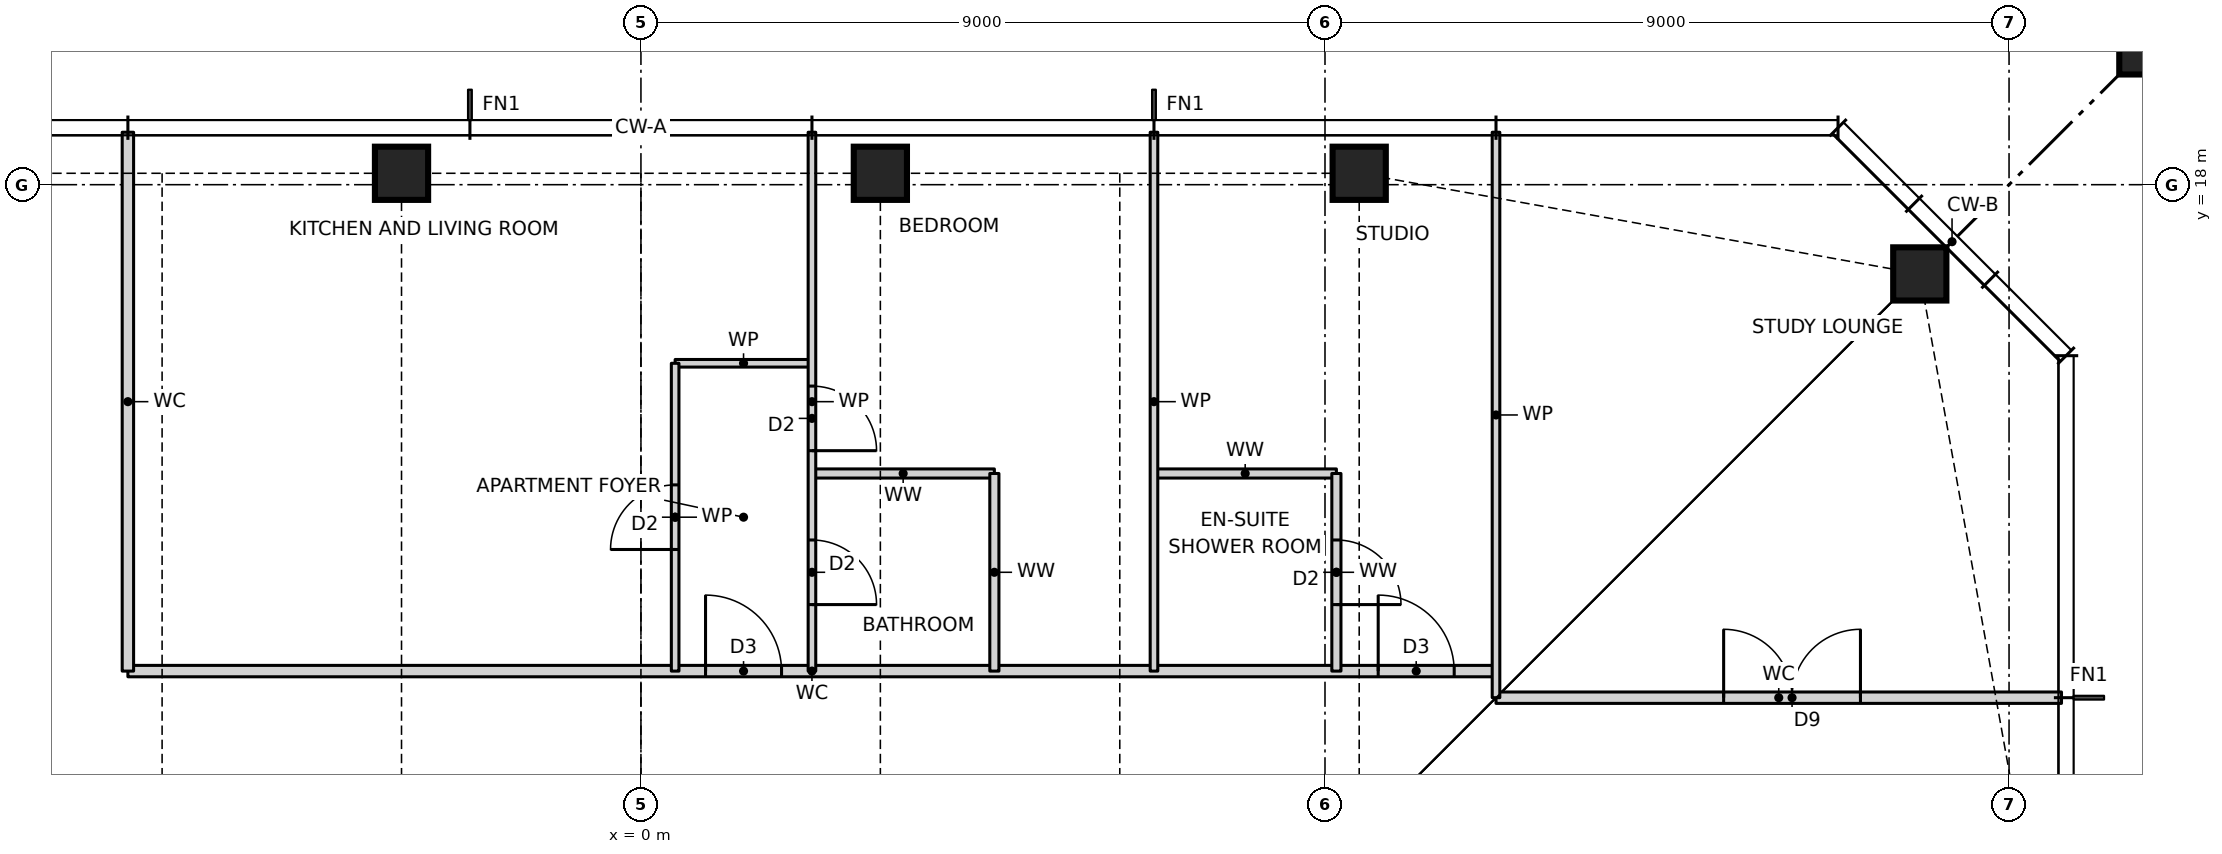
"""IFC4 building model, lengths in metres.
Left out: names, types, materials, properties, quantities, classifications, styles, units other than length and angle.
Written with IfcOpenShell. Run it as: python <this file> out.ifc"""

import sys

from ifc_helpers import new_model, si_unit, direction, frame, frame_2d, origin, origin_2d, place, context, subcontext, project, spatial, rectangle, hollow_rectangle, i_section, extrude, element, fill, save


model = new_model("IFC4")
c1 = context("Model", 3, precision=1e-05, world=origin(), true_north=direction((0.0, 1.0)))
c2 = subcontext(c1, "Body", "Model", "MODEL_VIEW")
j1 = project(units=[si_unit("LENGTHUNIT", "METRE"), si_unit("PLANEANGLEUNIT", "RADIAN")], contexts=[c1])
p1 = place(None, origin())
s1 = spatial("IfcSite", under=j1, at=p1, CompositionType="ELEMENT")
p2 = place(p1, origin())
s2 = spatial("IfcBuilding", under=s1, at=p2, CompositionType="ELEMENT")
p3 = place(p2, frame((0.0, 0.0, 191.5)))
s3 = spatial("IfcBuildingStorey", under=s2, at=p3, CompositionType="ELEMENT", Elevation=191.5)
for number, where, z_axis, x_axis in (
    (1, (16.826, 16.826, 0.0), (0.0, 0.0, 1.0), (1.0, 0.0, 0.0)),
    (2, (9.45, 18.15, 0.0), (0.0, 0.0, 1.0), (1.0, 0.0, 0.0)),
    (3, (3.15, 18.15, 0.0), (0.0, 0.0, 1.0), (1.0, 0.0, 0.0)),
    (4, (-3.15, 18.15, 0.0), (0.0, 0.0, 1.0), (1.0, 0.0, 0.0)),
):
    element("IfcColumn", number, at=place(p3, frame(where, z_axis=z_axis, x_axis=x_axis)), inside=s3, PredefinedType="COLUMN", context=c2, shape_type="SweptSolid", body=[
        extrude(hollow_rectangle(XDim=0.7, YDim=0.7, WallThickness=0.06, at=origin_2d()), origin(), (0.0, 0.0, 1.0), 3.5),
    ])
p4 = place(p3, frame((21.65, 21.65, 0.0), z_axis=(0.0, 0.0, 1.0), x_axis=(1.0, 0.0, 0.0)))
e5 = element("IfcColumn", 5, at=p4, inside=s3, PredefinedType="COLUMN", context=c2, shape_type="SweptSolid", body=[
    extrude(rectangle(XDim=4.4, YDim=4.4, at=origin_2d()), origin(), (0.0, 0.0, 1.0), 3.5),
    extrude(i_section(OverallWidth=0.478, OverallDepth=0.599, WebThickness=0.1, FlangeThickness=0.14, at=origin_2d()), origin(), (0.0, 0.0, 1.0), 3.5),
])
p5 = place(p3, frame((11.25, 11.25, 0.0), z_axis=(0.0, 0.0, 1.0), x_axis=(1.0, 0.0, 0.0)))
e6 = element("IfcWall", 6, at=p5, inside=s3, PredefinedType="PARTITIONING", context=c2, shape_type="SweptSolid", body=[
    extrude(rectangle(XDim=7.44, YDim=0.15, at=frame_2d((3.72, 0.0))), origin(), (0.0, 0.0, 1.0), 3.27),
])
p6 = place(p5, frame((2.995, 0.0, 0.0)))
e7 = element("IfcOpeningElement", 7, at=p6, cuts=e6, PredefinedType="OPENING", context=c2, shape_type="SweptSolid", body=[
    extrude(rectangle(XDim=1.8, YDim=2.1, at=frame_2d((0.9, 1.05))), frame((0.0, 0.085, 0.0), z_axis=(0.0, -1.0, 0.0), x_axis=(1.0, 0.0, 0.0)), (0.0, 0.0, 1.0), 0.17),
])
p7 = place(p3, frame((-6.75, 11.6, 0.0), z_axis=(0.0, 0.0, 1.0), x_axis=(1.0, 0.0, 0.0)))
e8 = element("IfcWall", 8, at=p7, inside=s3, PredefinedType="PARTITIONING", context=c2, shape_type="SweptSolid", body=[
    extrude(rectangle(XDim=18.0, YDim=0.15, at=frame_2d((9.0, 0.0))), origin(), (0.0, 0.0, 1.0), 3.27),
])
p8 = place(p7, frame((16.45, 0.0, 0.0)))
e9 = element("IfcOpeningElement", 9, at=p8, cuts=e8, PredefinedType="OPENING", context=c2, shape_type="SweptSolid", body=[
    extrude(rectangle(XDim=1.0, YDim=2.1, at=frame_2d((0.5, 1.05))), frame((0.0, 0.085, 0.0), z_axis=(0.0, -1.0, 0.0), x_axis=(1.0, 0.0, 0.0)), (0.0, 0.0, 1.0), 0.17),
])
p9 = place(p7, frame((7.6, 0.0, 0.0)))
e10 = element("IfcOpeningElement", 10, at=p9, cuts=e8, PredefinedType="OPENING", context=c2, shape_type="SweptSolid", body=[
    extrude(rectangle(XDim=1.0, YDim=2.1, at=frame_2d((0.5, 1.05))), frame((0.0, 0.085, 0.0), z_axis=(0.0, -1.0, 0.0), x_axis=(1.0, 0.0, 0.0)), (0.0, 0.0, 1.0), 0.17),
])
for number, where, z_axis, x_axis in (
    (11, (2.25, 14.2, 0.0), (0.0, 0.0, 1.0), (1.0, 0.0, 0.0)),
    (12, (6.75, 14.2, 0.0), (0.0, 0.0, 1.0), (1.0, 0.0, 0.0)),
):
    element("IfcWall", number, at=place(p3, frame(where, z_axis=z_axis, x_axis=x_axis)), inside=s3, PredefinedType="PARTITIONING", context=c2, shape_type="SweptSolid", body=[
        extrude(rectangle(XDim=2.4, YDim=0.12, at=frame_2d((1.2, 0.0))), origin(), (0.0, 0.0, 1.0), 3.27),
    ])
p10 = place(p3, frame((0.45, 15.65, 0.0), z_axis=(0.0, 0.0, 1.0), x_axis=(1.0, 0.0, 0.0)))
e13 = element("IfcWall", 13, at=p10, inside=s3, PredefinedType="PARTITIONING", context=c2, shape_type="SweptSolid", body=[
    extrude(rectangle(XDim=1.8, YDim=0.1, at=frame_2d((0.9, 0.0))), origin(), (0.0, 0.0, 1.0), 3.27),
])
p11 = place(p3, frame((11.25, 11.25, 0.0), z_axis=(0.0, 0.0, 1.0), x_axis=(0.0, 1.0, 0.0)))
e14 = element("IfcWall", 14, at=p11, inside=s3, PredefinedType="PARTITIONING", context=c2, shape_type="SweptSolid", body=[
    extrude(rectangle(XDim=7.44, YDim=0.1, at=frame_2d((3.72, 0.0))), origin(), (0.0, 0.0, 1.0), 3.27),
])
p12 = place(p3, frame((9.15, 11.6, 0.0), z_axis=(0.0, 0.0, 1.0), x_axis=(0.0, 1.0, 0.0)))
e15 = element("IfcWall", 15, at=p12, inside=s3, PredefinedType="PARTITIONING", context=c2, shape_type="SweptSolid", body=[
    extrude(rectangle(XDim=2.6, YDim=0.12, at=frame_2d((1.3, 0.0))), origin(), (0.0, 0.0, 1.0), 3.27),
])
p13 = place(p12, frame((0.875, 0.0, 0.0)))
e16 = element("IfcOpeningElement", 16, at=p13, cuts=e15, PredefinedType="OPENING", context=c2, shape_type="SweptSolid", body=[
    extrude(rectangle(XDim=0.85, YDim=2.1, at=frame_2d((0.425, 1.05))), frame((0.0, 0.07, 0.0), z_axis=(0.0, -1.0, 0.0), x_axis=(1.0, 0.0, 0.0)), (0.0, 0.0, 1.0), 0.14),
])
p14 = place(p3, frame((6.75, 11.6, 0.0), z_axis=(0.0, 0.0, 1.0), x_axis=(0.0, 1.0, 0.0)))
e17 = element("IfcWall", 17, at=p14, inside=s3, PredefinedType="PARTITIONING", context=c2, shape_type="SweptSolid", body=[
    extrude(rectangle(XDim=7.09, YDim=0.1, at=frame_2d((3.545, 0.0))), origin(), (0.0, 0.0, 1.0), 3.27),
])
p15 = place(p3, frame((4.65, 11.6, 0.0), z_axis=(0.0, 0.0, 1.0), x_axis=(0.0, 1.0, 0.0)))
e18 = element("IfcWall", 18, at=p15, inside=s3, PredefinedType="PARTITIONING", context=c2, shape_type="SweptSolid", body=[
    extrude(rectangle(XDim=2.6, YDim=0.12, at=frame_2d((1.3, 0.0))), origin(), (0.0, 0.0, 1.0), 3.27),
])
p16 = place(p3, frame((2.25, 11.6, 0.0), z_axis=(0.0, 0.0, 1.0), x_axis=(0.0, 1.0, 0.0)))
e19 = element("IfcWall", 19, at=p16, inside=s3, PredefinedType="PARTITIONING", context=c2, shape_type="SweptSolid", body=[
    extrude(rectangle(XDim=7.09, YDim=0.1, at=frame_2d((3.545, 0.0))), origin(), (0.0, 0.0, 1.0), 3.27),
])
p17 = place(p16, frame((2.9, 0.0, 0.0)))
e20 = element("IfcOpeningElement", 20, at=p17, cuts=e19, PredefinedType="OPENING", context=c2, shape_type="SweptSolid", body=[
    extrude(rectangle(XDim=0.85, YDim=2.1, at=frame_2d((0.425, 1.05))), frame((0.0, 0.06, 0.0), z_axis=(0.0, -1.0, 0.0), x_axis=(1.0, 0.0, 0.0)), (0.0, 0.0, 1.0), 0.12),
])
p18 = place(p16, frame((0.875, 0.0, 0.0)))
e21 = element("IfcOpeningElement", 21, at=p18, cuts=e19, PredefinedType="OPENING", context=c2, shape_type="SweptSolid", body=[
    extrude(rectangle(XDim=0.85, YDim=2.1, at=frame_2d((0.425, 1.05))), frame((0.0, 0.06, 0.0), z_axis=(0.0, -1.0, 0.0), x_axis=(1.0, 0.0, 0.0)), (0.0, 0.0, 1.0), 0.12),
])
p19 = place(p3, frame((0.45, 11.6, 0.0), z_axis=(0.0, 0.0, 1.0), x_axis=(0.0, 1.0, 0.0)))
e22 = element("IfcWall", 22, at=p19, inside=s3, PredefinedType="PARTITIONING", context=c2, shape_type="SweptSolid", body=[
    extrude(rectangle(XDim=4.05, YDim=0.1, at=frame_2d((2.025, 0.0))), origin(), (0.0, 0.0, 1.0), 3.27),
])
p20 = place(p19, frame((1.6, 0.0, 0.0)))
e23 = element("IfcOpeningElement", 23, at=p20, cuts=e22, PredefinedType="OPENING", context=c2, shape_type="SweptSolid", body=[
    extrude(rectangle(XDim=0.85, YDim=2.1, at=frame_2d((0.425, 1.05))), frame((0.0, 0.06, 0.0), z_axis=(0.0, -1.0, 0.0), x_axis=(1.0, 0.0, 0.0)), (0.0, 0.0, 1.0), 0.12),
])
p21 = place(p3, frame((-6.75, 11.6, 0.0), z_axis=(0.0, 0.0, 1.0), x_axis=(0.0, 1.0, 0.0)))
e24 = element("IfcWall", 24, at=p21, inside=s3, PredefinedType="PARTITIONING", context=c2, shape_type="SweptSolid", body=[
    extrude(rectangle(XDim=7.09, YDim=0.15, at=frame_2d((3.545, 0.0))), origin(), (0.0, 0.0, 1.0), 3.27),
])
p22 = place(p8, origin())
e25 = element("IfcDoor", 25, at=p22, inside=s3, OperationType="SINGLE_SWING_LEFT", PredefinedType="DOOR", context=c2, shape_type="SweptSolid", body=[
    extrude(rectangle(XDim=1.0, YDim=2.1, at=frame_2d((0.5, 1.05))), frame((0.0, 0.025, 0.0), z_axis=(0.0, -1.0, 0.0), x_axis=(1.0, 0.0, 0.0)), (0.0, 0.0, 1.0), 0.05),
])
fill(e9, e25)
p23 = place(p13, frame((0.85, 0.0, 0.0), z_axis=(0.0, 0.0, 1.0), x_axis=(-1.0, 0.0, 0.0)))
e26 = element("IfcDoor", 26, at=p23, inside=s3, OperationType="SINGLE_SWING_RIGHT", PredefinedType="DOOR", context=c2, shape_type="SweptSolid", body=[
    extrude(rectangle(XDim=0.85, YDim=2.1, at=frame_2d((0.425, 1.05))), frame((0.0, 0.025, 0.0), z_axis=(0.0, -1.0, 0.0), x_axis=(1.0, 0.0, 0.0)), (0.0, 0.0, 1.0), 0.05),
])
fill(e16, e26)
p24 = place(p9, origin())
e27 = element("IfcDoor", 27, at=p24, inside=s3, OperationType="SINGLE_SWING_LEFT", PredefinedType="DOOR", context=c2, shape_type="SweptSolid", body=[
    extrude(rectangle(XDim=1.0, YDim=2.1, at=frame_2d((0.5, 1.05))), frame((0.0, 0.025, 0.0), z_axis=(0.0, -1.0, 0.0), x_axis=(1.0, 0.0, 0.0)), (0.0, 0.0, 1.0), 0.05),
])
fill(e10, e27)
p25 = place(p20, origin())
e28 = element("IfcDoor", 28, at=p25, inside=s3, OperationType="SINGLE_SWING_LEFT", PredefinedType="DOOR", context=c2, shape_type="SweptSolid", body=[
    extrude(rectangle(XDim=0.85, YDim=2.1, at=frame_2d((0.425, 1.05))), frame((0.0, 0.025, 0.0), z_axis=(0.0, -1.0, 0.0), x_axis=(1.0, 0.0, 0.0)), (0.0, 0.0, 1.0), 0.05),
])
fill(e23, e28)
p26 = place(p17, frame((0.85, 0.0, 0.0), z_axis=(0.0, 0.0, 1.0), x_axis=(-1.0, 0.0, 0.0)))
e29 = element("IfcDoor", 29, at=p26, inside=s3, OperationType="SINGLE_SWING_RIGHT", PredefinedType="DOOR", context=c2, shape_type="SweptSolid", body=[
    extrude(rectangle(XDim=0.85, YDim=2.1, at=frame_2d((0.425, 1.05))), frame((0.0, 0.025, 0.0), z_axis=(0.0, -1.0, 0.0), x_axis=(1.0, 0.0, 0.0)), (0.0, 0.0, 1.0), 0.05),
])
fill(e20, e29)
p27 = place(p18, frame((0.85, 0.0, 0.0), z_axis=(0.0, 0.0, 1.0), x_axis=(-1.0, 0.0, 0.0)))
e30 = element("IfcDoor", 30, at=p27, inside=s3, OperationType="SINGLE_SWING_RIGHT", PredefinedType="DOOR", context=c2, shape_type="SweptSolid", body=[
    extrude(rectangle(XDim=0.85, YDim=2.1, at=frame_2d((0.425, 1.05))), frame((0.0, 0.025, 0.0), z_axis=(0.0, -1.0, 0.0), x_axis=(1.0, 0.0, 0.0)), (0.0, 0.0, 1.0), 0.05),
])
fill(e21, e30)
p28 = place(p6, origin())
e31 = element("IfcDoor", 31, at=p28, inside=s3, OperationType="DOUBLE_DOOR_SINGLE_SWING", PredefinedType="DOOR", context=c2, shape_type="SweptSolid", body=[
    extrude(rectangle(XDim=1.8, YDim=2.1, at=frame_2d((0.9, 1.05))), frame((0.0, 0.025, 0.0), z_axis=(0.0, -1.0, 0.0), x_axis=(1.0, 0.0, 0.0)), (0.0, 0.0, 1.0), 0.05),
])
fill(e7, e31)
save(model, sys.argv[1])
